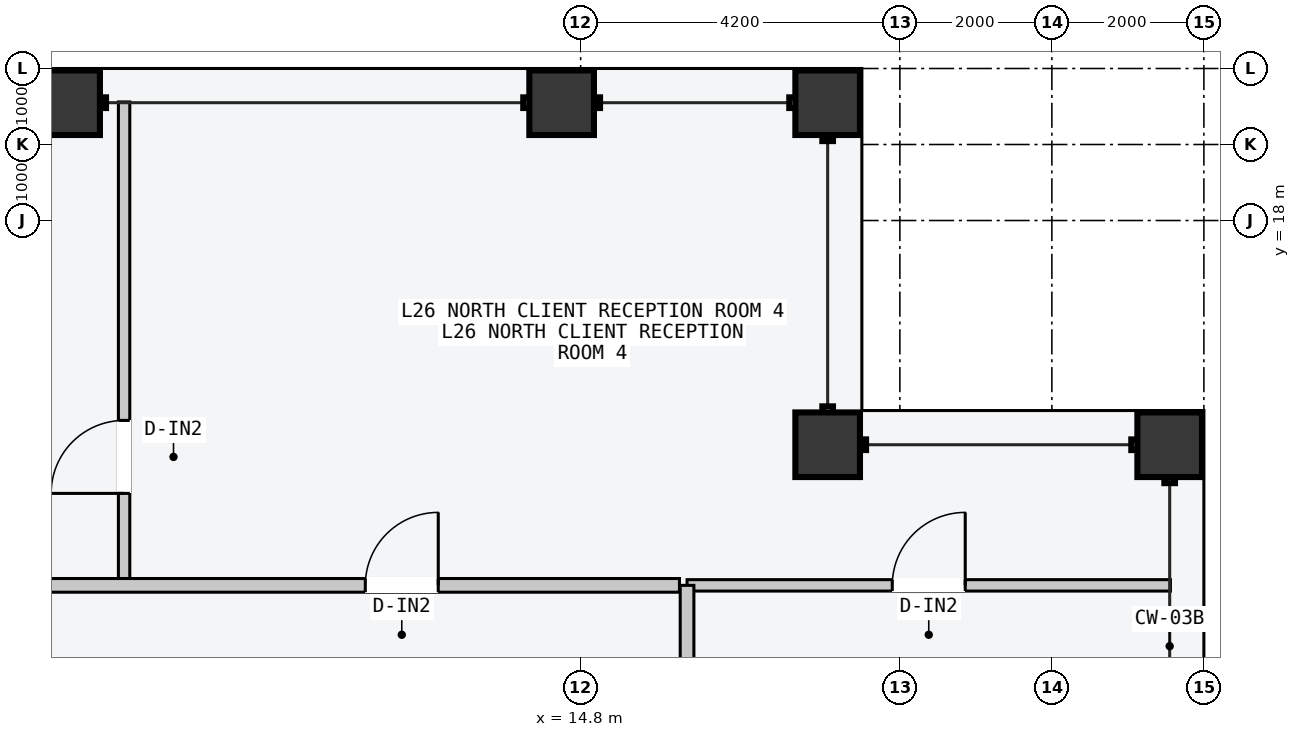
"""IFC4 building model, lengths in metres.
Left out: names, types, materials, properties, quantities, classifications, styles, units other than length and angle.
Written with IfcOpenShell. Run it as: python <this file> out.ifc"""

import sys

from ifc_helpers import new_model, si_unit, direction, frame, frame_2d, origin, origin_2d, place, context, subcontext, project, spatial, rectangle, hollow_rectangle, extrude, element, fill, save


model = new_model("IFC4")
c1 = context("Model", 3, precision=1e-05, world=origin(), true_north=direction((0.0, 1.0)))
c2 = subcontext(c1, "Body", "Model", "MODEL_VIEW")
j1 = project(units=[si_unit("LENGTHUNIT", "METRE"), si_unit("PLANEANGLEUNIT", "RADIAN")], contexts=[c1])
p1 = place(None, origin())
s1 = spatial("IfcSite", under=j1, at=p1, CompositionType="ELEMENT")
p2 = place(p1, origin())
s2 = spatial("IfcBuilding", under=s1, at=p2, CompositionType="ELEMENT")
p3 = place(p2, frame((0.0, 0.0, 102.6)))
s3 = spatial("IfcBuildingStorey", under=s2, at=p3, CompositionType="ELEMENT", Elevation=102.6)
for number, where, z_axis, x_axis in (
    (1, (8.05, 19.55, 0.0), (0.0, 0.0, 1.0), (1.0, 0.0, 0.0)),
    (2, (14.55, 19.55, 0.0), (0.0, 0.0, 1.0), (1.0, 0.0, 0.0)),
    (3, (18.05, 19.55, 0.0), (0.0, 0.0, 1.0), (1.0, 0.0, 0.0)),
    (4, (22.55, 15.05, 0.0), (0.0, 0.0, 1.0), (0.0, 1.0, 0.0)),
    (5, (18.05, 15.05, 0.0), (0.0, 0.0, 1.0), (1.0, 0.0, 0.0)),
):
    element("IfcColumn", number, at=place(p3, frame(where, z_axis=z_axis, x_axis=x_axis)), inside=s3, PredefinedType="COLUMN", context=c2, shape_type="SweptSolid", body=[
        extrude(hollow_rectangle(XDim=0.85, YDim=0.85, WallThickness=0.04, at=origin_2d()), origin(), (0.0, 0.0, 1.0), 3.6),
    ])
p4 = place(p3, frame((8.793, 13.26, 0.0), z_axis=(0.0, 0.0, 1.0), x_axis=(0.0, 1.0, 0.0)))
e6 = element("IfcWall", 6, at=p4, inside=s3, PredefinedType="PARTITIONING", context=c2, shape_type="SweptSolid", body=[
    extrude(rectangle(XDim=6.3, YDim=0.15, at=frame_2d((3.15, 0.0))), origin(), (0.0, 0.0, 1.0), 3.4),
])
p5 = place(p4, frame((1.15, 0.0, 0.0)))
e7 = element("IfcOpeningElement", 7, at=p5, cuts=e6, PredefinedType="OPENING", context=c2, shape_type="SweptSolid", body=[
    extrude(rectangle(XDim=0.96, YDim=2.18, at=frame_2d((0.48, 1.09))), frame((0.0, 0.085, 0.0), z_axis=(0.0, -1.0, 0.0), x_axis=(1.0, 0.0, 0.0)), (0.0, 0.0, 1.0), 0.17),
])
p6 = place(p3, frame((-16.1, 13.2, 0.0), z_axis=(0.0, 0.0, 1.0), x_axis=(1.0, 0.0, 0.0)))
e8 = element("IfcWall", 8, at=p6, inside=s3, PredefinedType="PARTITIONING", context=c2, shape_type="SweptSolid", body=[
    extrude(rectangle(XDim=32.2, YDim=0.18, at=frame_2d((16.1, 0.0))), origin(), (0.0, 0.0, 1.0), 3.4),
])
p7 = place(p6, frame((2.695, 0.0, 0.0)))
e9 = element("IfcOpeningElement", 9, at=p7, cuts=e8, PredefinedType="OPENING", context=c2, shape_type="SweptSolid", body=[
    extrude(rectangle(XDim=1.24, YDim=2.24, at=frame_2d((0.62, 1.12))), frame((0.0, 0.1, 0.0), z_axis=(0.0, -1.0, 0.0), x_axis=(1.0, 0.0, 0.0)), (0.0, 0.0, 1.0), 0.2),
])
p8 = place(p6, frame((11.511, 0.0, 0.0)))
e10 = element("IfcOpeningElement", 10, at=p8, cuts=e8, PredefinedType="OPENING", context=c2, shape_type="SweptSolid", body=[
    extrude(rectangle(XDim=1.4, YDim=2.2, at=frame_2d((0.7, 1.1))), frame((0.0, 0.1, 0.0), z_axis=(0.0, -1.0, 0.0), x_axis=(1.0, 0.0, 0.0)), (0.0, 0.0, 1.0), 0.2),
])
p9 = place(p6, frame((20.892, 0.0, 0.0)))
e11 = element("IfcOpeningElement", 11, at=p9, cuts=e8, PredefinedType="OPENING", context=c2, shape_type="SweptSolid", body=[
    extrude(rectangle(XDim=0.9, YDim=2.15, at=frame_2d((0.45, 1.075))), frame((0.0, 0.1, 0.0), z_axis=(0.0, -1.0, 0.0), x_axis=(1.0, 0.0, 0.0)), (0.0, 0.0, 1.0), 0.2),
])
p10 = place(p6, frame((28.067, 0.0, 0.0)))
e12 = element("IfcOpeningElement", 12, at=p10, cuts=e8, PredefinedType="OPENING", context=c2, shape_type="SweptSolid", body=[
    extrude(rectangle(XDim=0.96, YDim=2.18, at=frame_2d((0.48, 1.09))), frame((0.0, 0.1, 0.0), z_axis=(0.0, -1.0, 0.0), x_axis=(1.0, 0.0, 0.0)), (0.0, 0.0, 1.0), 0.2),
])
p11 = place(p3, frame((16.2, 13.2, 0.0), z_axis=(0.0, 0.0, 1.0), x_axis=(1.0, 0.0, 0.0)))
e13 = element("IfcWall", 13, at=p11, inside=s3, PredefinedType="PARTITIONING", context=c2, shape_type="SweptSolid", body=[
    extrude(rectangle(XDim=6.36, YDim=0.15, at=frame_2d((3.18, 0.0))), origin(), (0.0, 0.0, 1.0), 3.4),
])
p12 = place(p11, frame((2.7, 0.0, 0.0)))
e14 = element("IfcOpeningElement", 14, at=p12, cuts=e13, PredefinedType="OPENING", context=c2, shape_type="SweptSolid", body=[
    extrude(rectangle(XDim=0.96, YDim=2.18, at=frame_2d((0.48, 1.09))), frame((0.0, 0.085, 0.0), z_axis=(0.0, -1.0, 0.0), x_axis=(1.0, 0.0, 0.0)), (0.0, 0.0, 1.0), 0.17),
])
p13 = place(p3, frame((16.2, 11.25, 0.0), z_axis=(0.0, 0.0, 1.0), x_axis=(0.0, 1.0, 0.0)))
e15 = element("IfcWall", 15, at=p13, inside=s3, PredefinedType="PARTITIONING", context=c2, shape_type="SweptSolid", body=[
    extrude(rectangle(XDim=1.95, YDim=0.18, at=frame_2d((0.975, 0.0))), origin(), (0.0, 0.0, 1.0), 3.4),
])
p14 = place(p5, origin())
e16 = element("IfcDoor", 16, at=p14, inside=s3, OperationType="SINGLE_SWING_LEFT", PredefinedType="DOOR", context=c2, shape_type="SweptSolid", body=[
    extrude(rectangle(XDim=0.96, YDim=2.18, at=frame_2d((0.48, 1.09))), frame((0.0, 0.025, 0.0), z_axis=(0.0, -1.0, 0.0), x_axis=(1.0, 0.0, 0.0)), (0.0, 0.0, 1.0), 0.05),
])
fill(e7, e16)
p15 = place(p10, origin())
e17 = element("IfcDoor", 17, at=p15, inside=s3, OperationType="SINGLE_SWING_RIGHT", PredefinedType="DOOR", context=c2, shape_type="SweptSolid", body=[
    extrude(rectangle(XDim=0.96, YDim=2.18, at=frame_2d((0.48, 1.09))), frame((0.0, 0.025, 0.0), z_axis=(0.0, -1.0, 0.0), x_axis=(1.0, 0.0, 0.0)), (0.0, 0.0, 1.0), 0.05),
])
fill(e12, e17)
p16 = place(p12, origin())
e18 = element("IfcDoor", 18, at=p16, inside=s3, OperationType="SINGLE_SWING_RIGHT", PredefinedType="DOOR", context=c2, shape_type="SweptSolid", body=[
    extrude(rectangle(XDim=0.96, YDim=2.18, at=frame_2d((0.48, 1.09))), frame((0.0, 0.025, 0.0), z_axis=(0.0, -1.0, 0.0), x_axis=(1.0, 0.0, 0.0)), (0.0, 0.0, 1.0), 0.05),
])
fill(e14, e18)
save(model, sys.argv[1])
